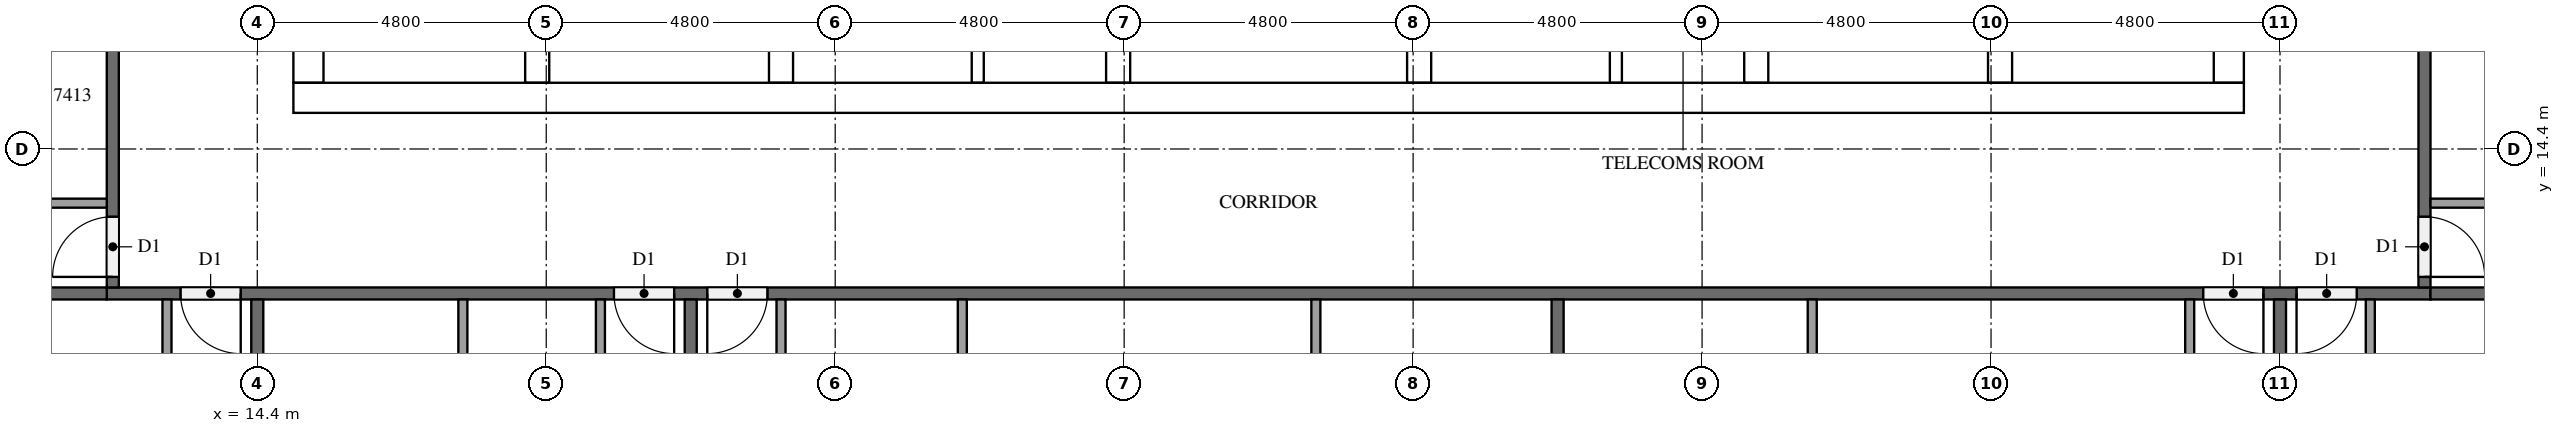
"""IFC4 building model, lengths in metres.
Left out: names, types, materials, properties, quantities, classifications, styles, units other than length and angle.
Written with IfcOpenShell. Run it as: python <this file> out.ifc"""

import sys

from ifc_helpers import new_model, si_unit, direction, frame, frame_2d, origin, place, context, subcontext, project, spatial, rectangle, extrude, element, fill, save


model = new_model("IFC4")
c1 = context("Model", 3, precision=1e-05, world=origin(), true_north=direction((0.0, 1.0)))
c2 = subcontext(c1, "Body", "Model", "MODEL_VIEW")
j1 = project(units=[si_unit("LENGTHUNIT", "METRE"), si_unit("PLANEANGLEUNIT", "RADIAN")], contexts=[c1])
p1 = place(None, origin())
s1 = spatial("IfcSite", under=j1, at=p1, CompositionType="ELEMENT")
p2 = place(p1, origin())
s2 = spatial("IfcBuilding", under=s1, at=p2, CompositionType="ELEMENT")
p3 = place(p2, frame((0.0, 0.0, 282.6)))
s3 = spatial("IfcBuildingStorey", under=s2, at=p3, CompositionType="ELEMENT", Elevation=282.6)
p4 = place(p3, frame((15.0, 15.25, 0.0), z_axis=(0.0, 0.0, 1.0), x_axis=(1.0, 0.0, 0.0)))
e1 = element("IfcWall", 1, at=p4, inside=s3, PredefinedType="SHEAR", context=c2, shape_type="SweptSolid", body=[
    extrude(rectangle(XDim=32.4, YDim=0.5, at=frame_2d((16.2, 0.0))), origin(), (0.0, 0.0, 1.0), 3.2),
])
p5 = place(p4, frame((15.3, 0.0, 0.0)))
e2 = element("IfcOpeningElement", 2, at=p5, cuts=e1, PredefinedType="OPENING", context=c2, shape_type="SweptSolid", body=[
    extrude(rectangle(XDim=1.8, YDim=2.1, at=frame_2d((0.9, 1.05))), frame((0.0, 0.26, 0.0), z_axis=(0.0, -1.0, 0.0), x_axis=(1.0, 0.0, 0.0)), (0.0, 0.0, 1.0), 0.52),
])
p6 = place(p3, frame((15.25, 15.5, 0.0), z_axis=(0.0, 0.0, 1.0), x_axis=(0.0, 1.0, 0.0)))
e3 = element("IfcWall", 3, at=p6, inside=s3, PredefinedType="SHEAR", context=c2, shape_type="SweptSolid", body=[
    extrude(rectangle(XDim=21.8, YDim=0.5, at=frame_2d((10.9, 0.0))), origin(), (0.0, 0.0, 1.0), 3.2),
])
p7 = place(p6, frame((5.26, 0.0, 0.0)))
e4 = element("IfcOpeningElement", 4, at=p7, cuts=e3, PredefinedType="OPENING", context=c2, shape_type="SweptSolid", body=[
    extrude(rectangle(XDim=1.2, YDim=2.1, at=frame_2d((0.6, 1.05))), frame((0.0, 0.26, 0.0), z_axis=(0.0, -1.0, 0.0), x_axis=(1.0, 0.0, 0.0)), (0.0, 0.0, 1.0), 0.52),
])
p8 = place(p3, frame((47.15, 15.5, 0.0), z_axis=(0.0, 0.0, 1.0), x_axis=(0.0, 1.0, 0.0)))
e5 = element("IfcWall", 5, at=p8, inside=s3, PredefinedType="SHEAR", context=c2, shape_type="SweptSolid", body=[
    extrude(rectangle(XDim=21.8, YDim=0.5, at=frame_2d((10.9, 0.0))), origin(), (0.0, 0.0, 1.0), 3.2),
])
p9 = place(p8, frame((10.6, 0.0, 0.0)))
e6 = element("IfcOpeningElement", 6, at=p9, cuts=e5, PredefinedType="OPENING", context=c2, shape_type="SweptSolid", body=[
    extrude(rectangle(XDim=1.2, YDim=2.1, at=frame_2d((0.6, 1.05))), frame((0.0, 0.26, 0.0), z_axis=(0.0, -1.0, 0.0), x_axis=(1.0, 0.0, 0.0)), (0.0, 0.0, 1.0), 0.52),
])
p10 = place(p3, frame((19.05, 15.5, 0.0), z_axis=(0.0, 0.0, 1.0), x_axis=(0.0, 1.0, 0.0)))
e7 = element("IfcWall", 7, at=p10, inside=s3, PredefinedType="SHEAR", context=c2, shape_type="SweptSolid", body=[
    extrude(rectangle(XDim=15.55, YDim=0.4, at=frame_2d((7.775, 0.0))), origin(), (0.0, 0.0, 1.0), 3.2),
])
p11 = place(p10, frame((9.95, 0.0, 0.0)))
e8 = element("IfcOpeningElement", 8, at=p11, cuts=e7, PredefinedType="OPENING", context=c2, shape_type="SweptSolid", body=[
    extrude(rectangle(XDim=1.1, YDim=2.1, at=frame_2d((0.55, 1.05))), frame((0.0, 0.21, 0.0), z_axis=(0.0, -1.0, 0.0), x_axis=(1.0, 0.0, 0.0)), (0.0, 0.0, 1.0), 0.42),
])
p12 = place(p10, frame((13.45, 0.0, 0.0)))
e9 = element("IfcOpeningElement", 9, at=p12, cuts=e7, PredefinedType="OPENING", context=c2, shape_type="SweptSolid", body=[
    extrude(rectangle(XDim=1.1, YDim=2.1, at=frame_2d((0.55, 1.05))), frame((0.0, 0.21, 0.0), z_axis=(0.0, -1.0, 0.0), x_axis=(1.0, 0.0, 0.0)), (0.0, 0.0, 1.0), 0.42),
])
p13 = place(p10, frame((0.7, 0.0, 0.0)))
e10 = element("IfcOpeningElement", 10, at=p13, cuts=e7, PredefinedType="OPENING", context=c2, shape_type="SweptSolid", body=[
    extrude(rectangle(XDim=1.2, YDim=2.1, at=frame_2d((0.6, 1.05))), frame((0.0, 0.21, 0.0), z_axis=(0.0, -1.0, 0.0), x_axis=(1.0, 0.0, 0.0)), (0.0, 0.0, 1.0), 0.42),
])
p14 = place(p3, frame((23.1, 15.5, 0.0), z_axis=(0.0, 0.0, 1.0), x_axis=(0.0, 1.0, 0.0)))
e11 = element("IfcWall", 11, at=p14, inside=s3, PredefinedType="SHEAR", context=c2, shape_type="SweptSolid", body=[
    extrude(rectangle(XDim=21.8, YDim=0.4, at=frame_2d((10.9, 0.0))), origin(), (0.0, 0.0, 1.0), 3.2),
])
p15 = place(p3, frame((39.3, 15.5, 0.0), z_axis=(0.0, 0.0, 1.0), x_axis=(0.0, 1.0, 0.0)))
e12 = element("IfcWall", 12, at=p15, inside=s3, PredefinedType="SHEAR", context=c2, shape_type="SweptSolid", body=[
    extrude(rectangle(XDim=8.75, YDim=0.4, at=frame_2d((4.375, 0.0))), origin(), (0.0, 0.0, 1.0), 3.2),
])
p16 = place(p3, frame((43.35, 15.5, 0.0), z_axis=(0.0, 0.0, 1.0), x_axis=(0.0, 1.0, 0.0)))
e13 = element("IfcWall", 13, at=p16, inside=s3, PredefinedType="SHEAR", context=c2, shape_type="SweptSolid", body=[
    extrude(rectangle(XDim=8.75, YDim=0.4, at=frame_2d((4.375, 0.0))), origin(), (0.0, 0.0, 1.0), 3.2),
])
p17 = place(p16, frame((0.7, 0.0, 0.0)))
e14 = element("IfcOpeningElement", 14, at=p17, cuts=e13, PredefinedType="OPENING", context=c2, shape_type="SweptSolid", body=[
    extrude(rectangle(XDim=1.2, YDim=2.1, at=frame_2d((0.6, 1.05))), frame((0.0, 0.21, 0.0), z_axis=(0.0, -1.0, 0.0), x_axis=(1.0, 0.0, 0.0)), (0.0, 0.0, 1.0), 0.42),
])
for number, where, z_axis, x_axis in (
    (15, (28.7, 15.5, 0.0), (0.0, 0.0, 1.0), (0.0, 1.0, 0.0)),
    (16, (33.7, 15.5, 0.0), (0.0, 0.0, 1.0), (0.0, 1.0, 0.0)),
):
    element("IfcWall", number, at=place(p3, frame(where, z_axis=z_axis, x_axis=x_axis)), inside=s3, PredefinedType="SHEAR", context=c2, shape_type="SweptSolid", body=[
        extrude(rectangle(XDim=3.05, YDim=0.4, at=frame_2d((1.525, 0.0))), origin(), (0.0, 0.0, 1.0), 3.2),
    ])
for number, where, z_axis, x_axis in (
    (17, (26.368, 15.5, 0.0), (0.0, 0.0, 1.0), (0.0, 1.0, 0.0)),
    (18, (36.968, 15.5, 0.0), (0.0, 0.0, 1.0), (0.0, 1.0, 0.0)),
):
    element("IfcWall", number, at=place(p3, frame(where, z_axis=z_axis, x_axis=x_axis)), inside=s3, PredefinedType="PARTITIONING", context=c2, shape_type="SweptSolid", body=[
        extrude(rectangle(XDim=3.05, YDim=0.2, at=frame_2d((1.525, 0.0))), origin(), (0.0, 0.0, 1.0), 3.2),
    ])
p18 = place(p3, frame((50.5, 12.0, 0.0), z_axis=(0.0, 0.0, 1.0), x_axis=(-1.0, 0.0, 0.0)))
e19 = element("IfcWall", 19, at=p18, inside=s3, PredefinedType="PARTITIONING", context=c2, shape_type="SweptSolid", body=[
    extrude(rectangle(XDim=38.6, YDim=0.2, at=frame_2d((19.3, 0.0))), origin(), (0.0, 0.0, 1.0), 3.2),
])
p19 = place(p18, frame((36.375, 0.0, 0.0)))
e20 = element("IfcOpeningElement", 20, at=p19, cuts=e19, PredefinedType="OPENING", context=c2, shape_type="SweptSolid", body=[
    extrude(rectangle(XDim=1.0, YDim=2.1, at=frame_2d((0.5, 1.05))), frame((0.0, 0.11, 0.0), z_axis=(0.0, -1.0, 0.0), x_axis=(1.0, 0.0, 0.0)), (0.0, 0.0, 1.0), 0.22),
])
p20 = place(p18, frame((29.175, 0.0, 0.0)))
e21 = element("IfcOpeningElement", 21, at=p20, cuts=e19, PredefinedType="OPENING", context=c2, shape_type="SweptSolid", body=[
    extrude(rectangle(XDim=1.0, YDim=2.1, at=frame_2d((0.5, 1.05))), frame((0.0, 0.11, 0.0), z_axis=(0.0, -1.0, 0.0), x_axis=(1.0, 0.0, 0.0)), (0.0, 0.0, 1.0), 0.22),
])
p21 = place(p18, frame((27.625, 0.0, 0.0)))
e22 = element("IfcOpeningElement", 22, at=p21, cuts=e19, PredefinedType="OPENING", context=c2, shape_type="SweptSolid", body=[
    extrude(rectangle(XDim=1.0, YDim=2.1, at=frame_2d((0.5, 1.05))), frame((0.0, 0.11, 0.0), z_axis=(0.0, -1.0, 0.0), x_axis=(1.0, 0.0, 0.0)), (0.0, 0.0, 1.0), 0.22),
])
p22 = place(p18, frame((2.775, 0.0, 0.0)))
e23 = element("IfcOpeningElement", 23, at=p22, cuts=e19, PredefinedType="OPENING", context=c2, shape_type="SweptSolid", body=[
    extrude(rectangle(XDim=1.0, YDim=2.1, at=frame_2d((0.5, 1.05))), frame((0.0, 0.11, 0.0), z_axis=(0.0, -1.0, 0.0), x_axis=(1.0, 0.0, 0.0)), (0.0, 0.0, 1.0), 0.22),
])
p23 = place(p18, frame((1.225, 0.0, 0.0)))
e24 = element("IfcOpeningElement", 24, at=p23, cuts=e19, PredefinedType="OPENING", context=c2, shape_type="SweptSolid", body=[
    extrude(rectangle(XDim=1.0, YDim=2.1, at=frame_2d((0.5, 1.05))), frame((0.0, 0.11, 0.0), z_axis=(0.0, -1.0, 0.0), x_axis=(1.0, 0.0, 0.0)), (0.0, 0.0, 1.0), 0.22),
])
p24 = place(p3, frame((50.4, 40.7, 0.0), z_axis=(0.0, 0.0, 1.0), x_axis=(0.0, -1.0, 0.0)))
e25 = element("IfcWall", 25, at=p24, inside=s3, PredefinedType="PARTITIONING", context=c2, shape_type="SweptSolid", body=[
    extrude(rectangle(XDim=28.6, YDim=0.2, at=frame_2d((14.3, 0.0))), origin(), (0.0, 0.0, 1.0), 3.2),
])
p25 = place(p24, frame((27.425, 0.0, 0.0)))
e26 = element("IfcOpeningElement", 26, at=p25, cuts=e25, PredefinedType="OPENING", context=c2, shape_type="SweptSolid", body=[
    extrude(rectangle(XDim=1.0, YDim=2.1, at=frame_2d((0.5, 1.05))), frame((0.0, 0.11, 0.0), z_axis=(0.0, -1.0, 0.0), x_axis=(1.0, 0.0, 0.0)), (0.0, 0.0, 1.0), 0.22),
])
p26 = place(p24, frame((13.025, 0.0, 0.0)))
e27 = element("IfcOpeningElement", 27, at=p26, cuts=e25, PredefinedType="OPENING", context=c2, shape_type="SweptSolid", body=[
    extrude(rectangle(XDim=1.0, YDim=2.1, at=frame_2d((0.5, 1.05))), frame((0.0, 0.11, 0.0), z_axis=(0.0, -1.0, 0.0), x_axis=(1.0, 0.0, 0.0)), (0.0, 0.0, 1.0), 0.22),
])
p27 = place(p3, frame((12.0, 12.1, 0.0), z_axis=(0.0, 0.0, 1.0), x_axis=(0.0, 1.0, 0.0)))
e28 = element("IfcWall", 28, at=p27, inside=s3, PredefinedType="PARTITIONING", context=c2, shape_type="SweptSolid", body=[
    extrude(rectangle(XDim=28.6, YDim=0.2, at=frame_2d((14.3, 0.0))), origin(), (0.0, 0.0, 1.0), 3.2),
])
p28 = place(p27, frame((16.975, 0.0, 0.0)))
e29 = element("IfcOpeningElement", 29, at=p28, cuts=e28, PredefinedType="OPENING", context=c2, shape_type="SweptSolid", body=[
    extrude(rectangle(XDim=1.0, YDim=2.1, at=frame_2d((0.5, 1.05))), frame((0.0, 0.11, 0.0), z_axis=(0.0, -1.0, 0.0), x_axis=(1.0, 0.0, 0.0)), (0.0, 0.0, 1.0), 0.22),
])
p29 = place(p27, frame((0.175, 0.0, 0.0)))
e30 = element("IfcOpeningElement", 30, at=p29, cuts=e28, PredefinedType="OPENING", context=c2, shape_type="SweptSolid", body=[
    extrude(rectangle(XDim=1.0, YDim=2.1, at=frame_2d((0.5, 1.05))), frame((0.0, 0.11, 0.0), z_axis=(0.0, -1.0, 0.0), x_axis=(1.0, 0.0, 0.0)), (0.0, 0.0, 1.0), 0.22),
])
p30 = place(p3, frame((14.4, 11.9, 0.0), z_axis=(0.0, 0.0, 1.0), x_axis=(0.0, -1.0, 0.0)))
e31 = element("IfcWall", 31, at=p30, inside=s3, PredefinedType="PARTITIONING", context=c2, shape_type="SweptSolid", body=[
    extrude(rectangle(XDim=11.65, YDim=0.2, at=frame_2d((5.825, 0.0))), origin(), (0.0, 0.0, 1.0), 3.2),
])
for number, where, z_axis, x_axis in (
    (32, (0.1, 12.0, 0.0), (0.0, 0.0, 1.0), (1.0, 0.0, 0.0)),
    (33, (21.6, 11.9, 0.0), (0.0, 0.0, 1.0), (0.0, -1.0, 0.0)),
    (34, (36.0, 11.9, 0.0), (0.0, 0.0, 1.0), (0.0, -1.0, 0.0)),
    (35, (48.0, 11.9, 0.0), (0.0, 0.0, 1.0), (0.0, -1.0, 0.0)),
):
    element("IfcWall", number, at=place(p3, frame(where, z_axis=z_axis, x_axis=x_axis)), inside=s3, PredefinedType="PARTITIONING", context=c2, shape_type="SweptSolid", body=[
        extrude(rectangle(XDim=11.8, YDim=0.2, at=frame_2d((5.9, 0.0))), origin(), (0.0, 0.0, 1.0), 3.2),
    ])
p31 = place(p3, frame((50.5, 12.0, 0.0), z_axis=(0.0, 0.0, 1.0), x_axis=(1.0, 0.0, 0.0)))
e36 = element("IfcWall", 36, at=p31, inside=s3, PredefinedType="PARTITIONING", context=c2, shape_type="SweptSolid", body=[
    extrude(rectangle(XDim=7.0, YDim=0.2, at=frame_2d((3.5, 0.0))), origin(), (0.0, 0.0, 1.0), 3.2),
])
p32 = place(p3, frame((12.9, 11.9, 0.0), z_axis=(0.0, 0.0, 1.0), x_axis=(0.0, -1.0, 0.0)))
e37 = element("IfcWall", 37, at=p32, inside=s3, PredefinedType="PARTITIONING", context=c2, shape_type="SweptSolid", body=[
    extrude(rectangle(XDim=3.125, YDim=0.15, at=frame_2d((1.562, 0.0))), origin(), (0.0, 0.0, 1.0), 3.2),
])
p33 = place(p3, frame((17.815, 11.9, 0.0), z_axis=(0.0, 0.0, 1.0), x_axis=(0.0, -1.0, 0.0)))
e38 = element("IfcWall", 38, at=p33, inside=s3, PredefinedType="PARTITIONING", context=c2, shape_type="SweptSolid", body=[
    extrude(rectangle(XDim=2.975, YDim=0.15, at=frame_2d((1.487, 0.0))), origin(), (0.0, 0.0, 1.0), 3.2),
])
p34 = place(p3, frame((20.1, 11.9, 0.0), z_axis=(0.0, 0.0, 1.0), x_axis=(0.0, -1.0, 0.0)))
e39 = element("IfcWall", 39, at=p34, inside=s3, PredefinedType="PARTITIONING", context=c2, shape_type="SweptSolid", body=[
    extrude(rectangle(XDim=3.125, YDim=0.15, at=frame_2d((1.562, 0.0))), origin(), (0.0, 0.0, 1.0), 3.2),
])
for number, where, z_axis, x_axis in (
    (40, (26.112, 11.9, 0.0), (0.0, 0.0, 1.0), (0.0, -1.0, 0.0)),
    (41, (31.985, 11.9, 0.0), (0.0, 0.0, 1.0), (0.0, -1.0, 0.0)),
):
    element("IfcWall", number, at=place(p3, frame(where, z_axis=z_axis, x_axis=x_axis)), inside=s3, PredefinedType="PARTITIONING", context=c2, shape_type="SweptSolid", body=[
        extrude(rectangle(XDim=3.725, YDim=0.15, at=frame_2d((1.862, 0.0))), origin(), (0.0, 0.0, 1.0), 3.2),
    ])
for number, where, z_axis, x_axis in (
    (42, (23.1, 11.9, 0.0), (0.0, 0.0, 1.0), (0.0, -1.0, 0.0)),
    (43, (40.23, 11.9, 0.0), (0.0, 0.0, 1.0), (0.0, -1.0, 0.0)),
):
    element("IfcWall", number, at=place(p3, frame(where, z_axis=z_axis, x_axis=x_axis)), inside=s3, PredefinedType="PARTITIONING", context=c2, shape_type="SweptSolid", body=[
        extrude(rectangle(XDim=3.875, YDim=0.15, at=frame_2d((1.938, 0.0))), origin(), (0.0, 0.0, 1.0), 3.2),
    ])
p35 = place(p3, frame((46.5, 11.9, 0.0), z_axis=(0.0, 0.0, 1.0), x_axis=(0.0, -1.0, 0.0)))
e44 = element("IfcWall", 44, at=p35, inside=s3, PredefinedType="PARTITIONING", context=c2, shape_type="SweptSolid", body=[
    extrude(rectangle(XDim=4.025, YDim=0.15, at=frame_2d((2.012, 0.0))), origin(), (0.0, 0.0, 1.0), 3.2),
])
p36 = place(p3, frame((49.5, 11.9, 0.0), z_axis=(0.0, 0.0, 1.0), x_axis=(0.0, -1.0, 0.0)))
e45 = element("IfcWall", 45, at=p36, inside=s3, PredefinedType="PARTITIONING", context=c2, shape_type="SweptSolid", body=[
    extrude(rectangle(XDim=3.725, YDim=0.15, at=frame_2d((1.862, 0.0))), origin(), (0.0, 0.0, 1.0), 3.2),
])
p37 = place(p3, frame((50.5, 13.5, 0.0), z_axis=(0.0, 0.0, 1.0), x_axis=(1.0, 0.0, 0.0)))
e46 = element("IfcWall", 46, at=p37, inside=s3, PredefinedType="PARTITIONING", context=c2, shape_type="SweptSolid", body=[
    extrude(rectangle(XDim=2.375, YDim=0.15, at=frame_2d((1.188, 0.0))), origin(), (0.0, 0.0, 1.0), 3.2),
])
p38 = place(p3, frame((11.9, 13.5, 0.0), z_axis=(0.0, 0.0, 1.0), x_axis=(-1.0, 0.0, 0.0)))
e47 = element("IfcWall", 47, at=p38, inside=s3, PredefinedType="PARTITIONING", context=c2, shape_type="SweptSolid", body=[
    extrude(rectangle(XDim=3.725, YDim=0.15, at=frame_2d((1.862, 0.0))), origin(), (0.0, 0.0, 1.0), 3.2),
])
p39 = place(p5, frame((1.8, 0.0, 0.0), z_axis=(0.0, 0.0, 1.0), x_axis=(-1.0, 0.0, 0.0)))
e48 = element("IfcDoor", 48, at=p39, inside=s3, OperationType="DOUBLE_DOOR_SINGLE_SWING", PredefinedType="DOOR", context=c2, shape_type="SweptSolid", body=[
    extrude(rectangle(XDim=1.8, YDim=2.1, at=frame_2d((0.9, 1.05))), frame((0.0, 0.025, 0.0), z_axis=(0.0, -1.0, 0.0), x_axis=(1.0, 0.0, 0.0)), (0.0, 0.0, 1.0), 0.05),
])
fill(e2, e48)
p40 = place(p19, origin())
e49 = element("IfcDoor", 49, at=p40, inside=s3, OperationType="SINGLE_SWING_LEFT", PredefinedType="DOOR", context=c2, shape_type="SweptSolid", body=[
    extrude(rectangle(XDim=1.0, YDim=2.1, at=frame_2d((0.5, 1.05))), frame((0.0, 0.025, 0.0), z_axis=(0.0, -1.0, 0.0), x_axis=(1.0, 0.0, 0.0)), (0.0, 0.0, 1.0), 0.05),
])
fill(e20, e49)
p41 = place(p20, origin())
e50 = element("IfcDoor", 50, at=p41, inside=s3, OperationType="SINGLE_SWING_LEFT", PredefinedType="DOOR", context=c2, shape_type="SweptSolid", body=[
    extrude(rectangle(XDim=1.0, YDim=2.1, at=frame_2d((0.5, 1.05))), frame((0.0, 0.025, 0.0), z_axis=(0.0, -1.0, 0.0), x_axis=(1.0, 0.0, 0.0)), (0.0, 0.0, 1.0), 0.05),
])
fill(e21, e50)
p42 = place(p21, origin())
e51 = element("IfcDoor", 51, at=p42, inside=s3, OperationType="SINGLE_SWING_RIGHT", PredefinedType="DOOR", context=c2, shape_type="SweptSolid", body=[
    extrude(rectangle(XDim=1.0, YDim=2.1, at=frame_2d((0.5, 1.05))), frame((0.0, 0.025, 0.0), z_axis=(0.0, -1.0, 0.0), x_axis=(1.0, 0.0, 0.0)), (0.0, 0.0, 1.0), 0.05),
])
fill(e22, e51)
p43 = place(p22, origin())
e52 = element("IfcDoor", 52, at=p43, inside=s3, OperationType="SINGLE_SWING_LEFT", PredefinedType="DOOR", context=c2, shape_type="SweptSolid", body=[
    extrude(rectangle(XDim=1.0, YDim=2.1, at=frame_2d((0.5, 1.05))), frame((0.0, 0.025, 0.0), z_axis=(0.0, -1.0, 0.0), x_axis=(1.0, 0.0, 0.0)), (0.0, 0.0, 1.0), 0.05),
])
fill(e23, e52)
p44 = place(p23, origin())
e53 = element("IfcDoor", 53, at=p44, inside=s3, OperationType="SINGLE_SWING_RIGHT", PredefinedType="DOOR", context=c2, shape_type="SweptSolid", body=[
    extrude(rectangle(XDim=1.0, YDim=2.1, at=frame_2d((0.5, 1.05))), frame((0.0, 0.025, 0.0), z_axis=(0.0, -1.0, 0.0), x_axis=(1.0, 0.0, 0.0)), (0.0, 0.0, 1.0), 0.05),
])
fill(e24, e53)
p45 = place(p25, origin())
e54 = element("IfcDoor", 54, at=p45, inside=s3, OperationType="SINGLE_SWING_RIGHT", PredefinedType="DOOR", context=c2, shape_type="SweptSolid", body=[
    extrude(rectangle(XDim=1.0, YDim=2.1, at=frame_2d((0.5, 1.05))), frame((0.0, 0.025, 0.0), z_axis=(0.0, -1.0, 0.0), x_axis=(1.0, 0.0, 0.0)), (0.0, 0.0, 1.0), 0.05),
])
fill(e26, e54)
p46 = place(p29, origin())
e55 = element("IfcDoor", 55, at=p46, inside=s3, OperationType="SINGLE_SWING_LEFT", PredefinedType="DOOR", context=c2, shape_type="SweptSolid", body=[
    extrude(rectangle(XDim=1.0, YDim=2.1, at=frame_2d((0.5, 1.05))), frame((0.0, 0.025, 0.0), z_axis=(0.0, -1.0, 0.0), x_axis=(1.0, 0.0, 0.0)), (0.0, 0.0, 1.0), 0.05),
])
fill(e30, e55)
save(model, sys.argv[1])
